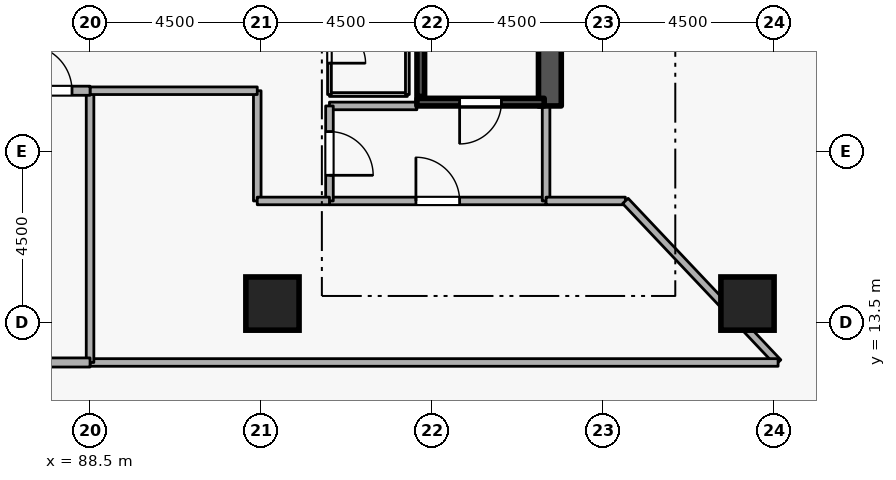
"""IFC4 building model, lengths in metres.
Left out: names, types, materials, properties, quantities, classifications, styles, units other than length and angle.
Written with IfcOpenShell. Run it as: python <this file> out.ifc"""

import sys

from ifc_helpers import new_model, si_unit, direction, frame, frame_2d, origin, origin_2d, place, context, subcontext, project, spatial, rectangle, extrude, element, fill, save


model = new_model("IFC4")
c1 = context("Model", 3, precision=1e-05, world=origin(), true_north=direction((0.0, 1.0)))
c2 = subcontext(c1, "Body", "Model", "MODEL_VIEW")
j1 = project(units=[si_unit("LENGTHUNIT", "METRE"), si_unit("PLANEANGLEUNIT", "RADIAN")], contexts=[c1])
p1 = place(None, origin())
s1 = spatial("IfcSite", under=j1, at=p1, CompositionType="ELEMENT")
p2 = place(p1, origin())
s2 = spatial("IfcBuilding", under=s1, at=p2, CompositionType="ELEMENT")
p3 = place(p2, frame((0.0, 0.0, 71.7)))
s3 = spatial("IfcBuildingStorey", under=s2, at=p3, CompositionType="ELEMENT", Elevation=71.7)
p4 = place(p3, frame((100.6, 19.2, 0.0), z_axis=(0.0, 0.0, 1.0), x_axis=(0.0, 1.0, 0.0)))
e1 = element("IfcWall", 1, at=p4, inside=s3, PredefinedType="SHEAR", context=c2, shape_type="SweptSolid", body=[
    extrude(rectangle(XDim=15.6, YDim=0.6, at=frame_2d((7.8, 0.0))), origin(), (0.0, 0.0, 1.0), 4.2),
])
for number, where, z_axis, x_axis in (
    (2, (105.8, 14.0, 0.0), (0.0, 0.0, 1.0), (1.0, 0.0, 0.0)),
    (3, (93.3, 14.0, 0.0), (0.0, 0.0, 1.0), (1.0, 0.0, 0.0)),
):
    element("IfcColumn", number, at=place(p3, frame(where, z_axis=z_axis, x_axis=x_axis)), inside=s3, PredefinedType="COLUMN", context=c2, shape_type="SweptSolid", body=[
        extrude(rectangle(XDim=1.4, YDim=1.4, at=origin_2d()), origin(), (0.0, 0.0, 1.0), 4.2),
    ])
p5 = place(p3, frame((100.45, 19.3, 0.0), z_axis=(0.0, 0.0, 1.0), x_axis=(-1.0, 0.0, 0.0)))
e4 = element("IfcWall", 4, at=p5, inside=s3, PredefinedType="SHEAR", context=c2, shape_type="SweptSolid", body=[
    extrude(rectangle(XDim=3.35, YDim=0.2, at=frame_2d((1.675, 0.0))), origin(), (0.0, 0.0, 1.0), 4.2),
])
p6 = place(p5, frame((1.125, 0.0, 0.0)))
e5 = element("IfcOpeningElement", 5, at=p6, cuts=e4, PredefinedType="OPENING", context=c2, shape_type="SweptSolid", body=[
    extrude(rectangle(XDim=1.1, YDim=2.1, at=frame_2d((0.55, 1.05))), frame((0.0, 0.11, 0.0), z_axis=(0.0, -1.0, 0.0), x_axis=(1.0, 0.0, 0.0)), (0.0, 0.0, 1.0), 0.22),
])
p7 = place(p3, frame((97.203, 26.55, 0.0), z_axis=(0.0, 0.0, 1.0), x_axis=(0.0, -1.0, 0.0)))
e6 = element("IfcWall", 6, at=p7, inside=s3, PredefinedType="SHEAR", context=c2, shape_type="SweptSolid", body=[
    extrude(rectangle(XDim=7.1, YDim=0.2, at=frame_2d((3.55, 0.0))), origin(), (0.0, 0.0, 1.0), 4.2),
])
p8 = place(p3, frame((94.8, 16.7, 0.0), z_axis=(0.0, 0.0, 1.0), x_axis=(1.0, 0.0, 0.0)))
e7 = element("IfcWall", 7, at=p8, inside=s3, PredefinedType="STANDARD", context=c2, shape_type="SweptSolid", body=[
    extrude(rectangle(XDim=5.7, YDim=0.2, at=frame_2d((2.85, 0.0))), origin(), (0.0, 0.0, 1.0), 3.86),
])
p9 = place(p8, frame((2.275, 0.0, 0.0)))
e8 = element("IfcOpeningElement", 8, at=p9, cuts=e7, PredefinedType="OPENING", context=c2, shape_type="SweptSolid", body=[
    extrude(rectangle(XDim=1.15, YDim=2.1, at=frame_2d((0.575, 1.05))), frame((0.0, 0.11, 0.0), z_axis=(0.0, -1.0, 0.0), x_axis=(1.0, 0.0, 0.0)), (0.0, 0.0, 1.0), 0.22),
])
p10 = place(p3, frame((100.5, 16.7, 0.0), z_axis=(0.0, 0.0, 1.0), x_axis=(0.0, 1.0, 0.0)))
e9 = element("IfcWall", 9, at=p10, inside=s3, PredefinedType="STANDARD", context=c2, shape_type="SweptSolid", body=[
    extrude(rectangle(XDim=2.5, YDim=0.2, at=frame_2d((1.25, 0.0))), origin(), (0.0, 0.0, 1.0), 3.86),
])
p11 = place(p3, frame((97.1, 19.2, 0.0), z_axis=(0.0, 0.0, 1.0), x_axis=(-1.0, 0.0, 0.0)))
e10 = element("IfcWall", 10, at=p11, inside=s3, PredefinedType="STANDARD", context=c2, shape_type="SweptSolid", body=[
    extrude(rectangle(XDim=2.3, YDim=0.2, at=frame_2d((1.15, 0.0))), origin(), (0.0, 0.0, 1.0), 3.065),
])
p12 = place(p3, frame((94.8, 19.2, 0.0), z_axis=(0.0, 0.0, 1.0), x_axis=(0.0, -1.0, 0.0)))
e11 = element("IfcWall", 11, at=p12, inside=s3, PredefinedType="STANDARD", context=c2, shape_type="SweptSolid", body=[
    extrude(rectangle(XDim=2.5, YDim=0.2, at=frame_2d((1.25, 0.0))), origin(), (0.0, 0.0, 1.0), 3.86),
])
p13 = place(p12, frame((0.675, 0.0, 0.0)))
e12 = element("IfcOpeningElement", 12, at=p13, cuts=e11, PredefinedType="OPENING", context=c2, shape_type="SweptSolid", body=[
    extrude(rectangle(XDim=1.15, YDim=2.1, at=frame_2d((0.575, 1.05))), frame((0.0, 0.11, 0.0), z_axis=(0.0, -1.0, 0.0), x_axis=(1.0, 0.0, 0.0)), (0.0, 0.0, 1.0), 0.22),
])
p14 = place(p3, frame((92.9, 19.6, 0.0), z_axis=(0.0, 0.0, 1.0), x_axis=(0.0, -1.0, 0.0)))
e13 = element("IfcWall", 13, at=p14, inside=s3, PredefinedType="STANDARD", context=c2, shape_type="SweptSolid", body=[
    extrude(rectangle(XDim=2.9, YDim=0.2, at=frame_2d((1.45, 0.0))), origin(), (0.0, 0.0, 1.0), 3.86),
])
p15 = place(p3, frame((92.9, 16.7, 0.0), z_axis=(0.0, 0.0, 1.0), x_axis=(1.0, 0.0, 0.0)))
e14 = element("IfcWall", 14, at=p15, inside=s3, PredefinedType="STANDARD", context=c2, shape_type="SweptSolid", body=[
    extrude(rectangle(XDim=1.9, YDim=0.2, at=frame_2d((0.95, 0.0))), origin(), (0.0, 0.0, 1.0), 3.86),
])
p16 = place(p3, frame((100.5, 16.7, 0.0), z_axis=(0.0, 0.0, 1.0), x_axis=(1.0, 0.0, 0.0)))
e15 = element("IfcWall", 15, at=p16, inside=s3, PredefinedType="STANDARD", context=c2, shape_type="SweptSolid", body=[
    extrude(rectangle(XDim=2.087, YDim=0.2, at=frame_2d((1.043, 0.0))), origin(), (0.0, 0.0, 1.0), 3.86),
])
p17 = place(p3, frame((102.587, 16.7, 0.0), z_axis=(0.0, 0.0, 1.0), x_axis=(0.687023003482, -0.726635667089, 0.0)))
e16 = element("IfcWall", 16, at=p17, inside=s3, PredefinedType="STANDARD", context=c2, shape_type="SweptSolid", body=[
    extrude(rectangle(XDim=5.849, YDim=0.2, at=frame_2d((2.924, 0.0))), origin(), (0.0, 0.0, 1.0), 3.86),
])
p18 = place(p3, frame((106.605, 12.45, 0.0), z_axis=(0.0, 0.0, 1.0), x_axis=(-1.0, 0.0, 0.0)))
e17 = element("IfcWall", 17, at=p18, inside=s3, PredefinedType="STANDARD", context=c2, shape_type="SweptSolid", body=[
    extrude(rectangle(XDim=18.105, YDim=0.2, at=frame_2d((9.052, 0.0))), origin(), (0.0, 0.0, 1.0), 3.365),
])
p19 = place(p3, frame((88.5, 12.45, 0.0), z_axis=(0.0, 0.0, 1.0), x_axis=(0.0, 1.0, 0.0)))
e18 = element("IfcWall", 18, at=p19, inside=s3, PredefinedType="STANDARD", context=c2, shape_type="SweptSolid", body=[
    extrude(rectangle(XDim=7.15, YDim=0.2, at=frame_2d((3.575, 0.0))), origin(), (0.0, 0.0, 1.0), 3.245),
])
p20 = place(p3, frame((88.5, 19.6, 0.0), z_axis=(0.0, 0.0, 1.0), x_axis=(1.0, 0.0, 0.0)))
e19 = element("IfcWall", 19, at=p20, inside=s3, PredefinedType="STANDARD", context=c2, shape_type="SweptSolid", body=[
    extrude(rectangle(XDim=4.4, YDim=0.2, at=frame_2d((2.2, 0.0))), origin(), (0.0, 0.0, 1.0), 3.065),
])
p21 = place(p3, frame((88.5, 12.45, 0.0), z_axis=(0.0, 0.0, 1.0), x_axis=(-1.0, 0.0, 0.0)))
e20 = element("IfcWall", 20, at=p21, inside=s3, PredefinedType="STANDARD", context=c2, shape_type="SweptSolid", body=[
    extrude(rectangle(XDim=2.15, YDim=0.24, at=frame_2d((1.075, 0.0))), origin(), (0.0, 0.0, 1.0), 3.86),
])
p22 = place(p3, frame((86.35, 19.6, 0.0), z_axis=(0.0, 0.0, 1.0), x_axis=(1.0, 0.0, 0.0)))
e21 = element("IfcWall", 21, at=p22, inside=s3, PredefinedType="STANDARD", context=c2, shape_type="SweptSolid", body=[
    extrude(rectangle(XDim=2.15, YDim=0.24, at=frame_2d((1.075, 0.0))), origin(), (0.0, 0.0, 1.0), 3.065),
])
p23 = place(p22, frame((0.475, 0.0, 0.0)))
e22 = element("IfcOpeningElement", 22, at=p23, cuts=e21, PredefinedType="OPENING", context=c2, shape_type="SweptSolid", body=[
    extrude(rectangle(XDim=1.2, YDim=2.1, at=frame_2d((0.6, 1.05))), frame((0.0, 0.13, 0.0), z_axis=(0.0, -1.0, 0.0), x_axis=(1.0, 0.0, 0.0)), (0.0, 0.0, 1.0), 0.26),
])
p24 = place(p3, frame((94.8, 19.5, 0.0), z_axis=(0.0, 0.0, 1.0), x_axis=(1.0, 0.0, 0.0)))
e23 = element("IfcWall", 23, at=p24, inside=s3, PredefinedType="PARTITIONING", context=c2, shape_type="SweptSolid", body=[
    extrude(rectangle(XDim=2.05, YDim=0.1, at=frame_2d((1.025, 0.0))), origin(), (0.0, 0.0, 1.0), 3.065),
])
p25 = place(p3, frame((96.85, 19.5, 0.0), z_axis=(0.0, 0.0, 1.0), x_axis=(0.0, 1.0, 0.0)))
e24 = element("IfcWall", 24, at=p25, inside=s3, PredefinedType="PARTITIONING", context=c2, shape_type="SweptSolid", body=[
    extrude(rectangle(XDim=2.6, YDim=0.1, at=frame_2d((1.3, 0.0))), origin(), (0.0, 0.0, 1.0), 3.86),
])
p26 = place(p3, frame((94.8, 22.1, 0.0), z_axis=(0.0, 0.0, 1.0), x_axis=(0.0, -1.0, 0.0)))
e25 = element("IfcWall", 25, at=p26, inside=s3, PredefinedType="PARTITIONING", context=c2, shape_type="SweptSolid", body=[
    extrude(rectangle(XDim=2.6, YDim=0.1, at=frame_2d((1.3, 0.0))), origin(), (0.0, 0.0, 1.0), 3.86),
])
p27 = place(p26, frame((0.825, 0.0, 0.0)))
e26 = element("IfcOpeningElement", 26, at=p27, cuts=e25, PredefinedType="OPENING", context=c2, shape_type="SweptSolid", body=[
    extrude(rectangle(XDim=0.95, YDim=2.1, at=frame_2d((0.475, 1.05))), frame((0.0, 0.06, 0.0), z_axis=(0.0, -1.0, 0.0), x_axis=(1.0, 0.0, 0.0)), (0.0, 0.0, 1.0), 0.12),
])
p28 = place(p6, origin())
e27 = element("IfcDoor", 27, at=p28, inside=s3, OperationType="SINGLE_SWING_RIGHT", PredefinedType="DOOR", context=c2, shape_type="SweptSolid", body=[
    extrude(rectangle(XDim=1.1, YDim=2.1, at=frame_2d((0.55, 1.05))), frame((0.0, 0.025, 0.0), z_axis=(0.0, -1.0, 0.0), x_axis=(1.0, 0.0, 0.0)), (0.0, 0.0, 1.0), 0.05),
])
fill(e5, e27)
p29 = place(p13, origin())
e28 = element("IfcDoor", 28, at=p29, inside=s3, OperationType="SINGLE_SWING_RIGHT", PredefinedType="DOOR", context=c2, shape_type="SweptSolid", body=[
    extrude(rectangle(XDim=1.15, YDim=2.1, at=frame_2d((0.575, 1.05))), frame((0.0, 0.025, 0.0), z_axis=(0.0, -1.0, 0.0), x_axis=(1.0, 0.0, 0.0)), (0.0, 0.0, 1.0), 0.05),
])
fill(e12, e28)
p30 = place(p27, origin())
e29 = element("IfcDoor", 29, at=p30, inside=s3, OperationType="SINGLE_SWING_RIGHT", PredefinedType="DOOR", context=c2, shape_type="SweptSolid", body=[
    extrude(rectangle(XDim=0.95, YDim=2.1, at=frame_2d((0.475, 1.05))), frame((0.0, 0.025, 0.0), z_axis=(0.0, -1.0, 0.0), x_axis=(1.0, 0.0, 0.0)), (0.0, 0.0, 1.0), 0.05),
])
fill(e26, e29)
p31 = place(p9, origin())
e30 = element("IfcDoor", 30, at=p31, inside=s3, OperationType="SINGLE_SWING_LEFT", PredefinedType="DOOR", context=c2, shape_type="SweptSolid", body=[
    extrude(rectangle(XDim=1.15, YDim=2.1, at=frame_2d((0.575, 1.05))), frame((0.0, 0.025, 0.0), z_axis=(0.0, -1.0, 0.0), x_axis=(1.0, 0.0, 0.0)), (0.0, 0.0, 1.0), 0.05),
])
fill(e8, e30)
p32 = place(p23, origin())
e31 = element("IfcDoor", 31, at=p32, inside=s3, OperationType="SINGLE_SWING_LEFT", PredefinedType="DOOR", context=c2, shape_type="SweptSolid", body=[
    extrude(rectangle(XDim=1.2, YDim=2.1, at=frame_2d((0.6, 1.05))), frame((0.0, 0.025, 0.0), z_axis=(0.0, -1.0, 0.0), x_axis=(1.0, 0.0, 0.0)), (0.0, 0.0, 1.0), 0.05),
])
fill(e22, e31)
save(model, sys.argv[1])
